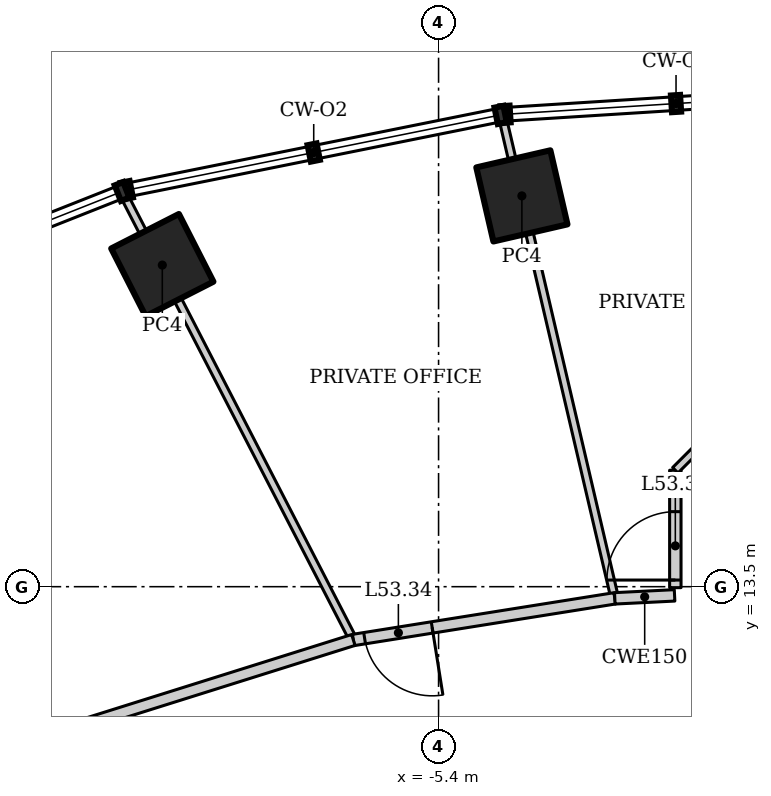
"""IFC4 building model, lengths in metres.
Left out: names, types, materials, properties, quantities, classifications, styles, units other than length and angle.
Written with IfcOpenShell. Run it as: python <this file> out.ifc"""

import sys

from ifc_helpers import new_model, si_unit, direction, frame, frame_2d, origin, origin_2d, place, context, subcontext, project, spatial, rectangle, hollow_rectangle, extrude, element, fill, save


model = new_model("IFC4")
c1 = context("Model", 3, precision=1e-05, world=origin(), true_north=direction((0.0, 1.0)))
c2 = subcontext(c1, "Body", "Model", "MODEL_VIEW")
j1 = project(units=[si_unit("LENGTHUNIT", "METRE"), si_unit("PLANEANGLEUNIT", "RADIAN")], contexts=[c1])
p1 = place(None, origin())
s1 = spatial("IfcSite", under=j1, at=p1, CompositionType="ELEMENT")
p2 = place(p1, origin())
s2 = spatial("IfcBuilding", under=s1, at=p2, CompositionType="ELEMENT")
p3 = place(p2, frame((0.0, 0.0, 228.4)))
s3 = spatial("IfcBuildingStorey", under=s2, at=p3, CompositionType="ELEMENT", Elevation=228.4)
for number, where, z_axis, x_axis in (
    (1, (-4.304, 18.642, 0.0), (0.0, 0.0, 1.0), (0.974, 0.225, 0.0)),
    (2, (-9.035, 17.731, 0.0), (0.0, 0.0, 1.0), (0.891, 0.454, 0.0)),
):
    element("IfcColumn", number, at=place(p3, frame(where, z_axis=z_axis, x_axis=x_axis)), inside=s3, PredefinedType="COLUMN", context=c2, shape_type="SweptSolid", body=[
        extrude(hollow_rectangle(XDim=1.0, YDim=1.0, WallThickness=0.08, at=origin_2d()), origin(), (0.0, 0.0, 1.0), 4.2),
    ])
p4 = place(p3, frame((-4.556, 19.657, 0.0), z_axis=(0.0, 0.0, 1.0), x_axis=(0.227524978141, -0.973772244584, 0.0)))
e3 = element("IfcWall", 3, at=p4, inside=s3, PredefinedType="PARTITIONING", context=c2, shape_type="SweptSolid", body=[
    extrude(rectangle(XDim=6.48, YDim=0.1, at=frame_2d((3.24, 0.0))), origin(), (0.0, 0.0, 1.0), 3.108),
])
p5 = place(p3, frame((-9.54, 18.65, 0.0), z_axis=(0.0, 0.0, 1.0), x_axis=(0.458420942987, -0.888735190611, 0.0)))
e4 = element("IfcWall", 4, at=p5, inside=s3, PredefinedType="PARTITIONING", context=c2, shape_type="SweptSolid", body=[
    extrude(rectangle(XDim=6.584, YDim=0.1, at=frame_2d((3.292, 0.0))), origin(), (0.0, 0.0, 1.0), 3.108),
])
p6 = place(p3, frame((-3.081, 13.347, 0.0), z_axis=(0.0, 0.0, 1.0), x_axis=(-0.987554093087, -0.157279729233, 0.0)))
e5 = element("IfcWall", 5, at=p6, inside=s3, PredefinedType="PARTITIONING", context=c2, shape_type="SweptSolid", body=[
    extrude(rectangle(XDim=3.483, YDim=0.15, at=frame_2d((1.742, 0.0))), origin(), (0.0, 0.0, 1.0), 4.05),
])
p7 = place(p6, frame((2.433, 0.0, 0.0)))
e6 = element("IfcOpeningElement", 6, at=p7, cuts=e5, PredefinedType="OPENING", context=c2, shape_type="SweptSolid", body=[
    extrude(rectangle(XDim=0.9, YDim=2.1, at=frame_2d((0.45, 1.05))), frame((0.0, 0.085, 0.0), z_axis=(0.0, -1.0, 0.0), x_axis=(1.0, 0.0, 0.0)), (0.0, 0.0, 1.0), 0.17),
])
p8 = place(p3, frame((-6.521, 12.799, 0.0), z_axis=(0.0, 0.0, 1.0), x_axis=(-0.954031103669, -0.299707612903, 0.0)))
e7 = element("IfcWall", 7, at=p8, inside=s3, PredefinedType="PARTITIONING", context=c2, shape_type="SweptSolid", body=[
    extrude(rectangle(XDim=4.695, YDim=0.15, at=frame_2d((2.348, 0.0))), origin(), (0.0, 0.0, 1.0), 4.05),
])
p9 = place(p3, frame((-2.295, 13.386, 0.0), z_axis=(0.0, 0.0, 1.0), x_axis=(-0.998768524691, -0.049612841959, 0.0)))
e8 = element("IfcWall", 8, at=p9, inside=s3, PredefinedType="PARTITIONING", context=c2, shape_type="SweptSolid", body=[
    extrude(rectangle(XDim=0.787, YDim=0.15, at=frame_2d((0.394, 0.0))), origin(), (0.0, 0.0, 1.0), 4.05),
])
p10 = place(p3, frame((-2.285, 13.487, 0.0), z_axis=(0.0, 0.0, 1.0), x_axis=(0.0, 1.0, 0.0)))
e9 = element("IfcWall", 9, at=p10, inside=s3, PredefinedType="PARTITIONING", context=c2, shape_type="SweptSolid", body=[
    extrude(rectangle(XDim=1.545, YDim=0.15, at=frame_2d((0.772, 0.0))), origin(), (0.0, 0.0, 1.0), 4.05),
])
p11 = place(p10, frame((0.1, 0.0, 0.0)))
e10 = element("IfcOpeningElement", 10, at=p11, cuts=e9, PredefinedType="OPENING", context=c2, shape_type="SweptSolid", body=[
    extrude(rectangle(XDim=0.9, YDim=2.1, at=frame_2d((0.45, 1.05))), frame((0.0, 0.085, 0.0), z_axis=(0.0, -1.0, 0.0), x_axis=(1.0, 0.0, 0.0)), (0.0, 0.0, 1.0), 0.17),
])
p12 = place(p3, frame((-2.285, 15.032, 0.0), z_axis=(0.0, 0.0, 1.0), x_axis=(0.707106781187, 0.707106781187, 0.0)))
e11 = element("IfcWall", 11, at=p12, inside=s3, PredefinedType="PARTITIONING", context=c2, shape_type="SweptSolid", body=[
    extrude(rectangle(XDim=1.064, YDim=0.1, at=frame_2d((0.532, 0.0))), origin(), (0.0, 0.0, 1.0), 4.05),
])
p13 = place(p11, origin())
e12 = element("IfcDoor", 12, at=p13, inside=s3, OperationType="SINGLE_SWING_LEFT", PredefinedType="DOOR", context=c2, shape_type="SweptSolid", body=[
    extrude(rectangle(XDim=0.9, YDim=2.1, at=frame_2d((0.45, 1.05))), frame((0.0, 0.025, 0.0), z_axis=(0.0, -1.0, 0.0), x_axis=(1.0, 0.0, 0.0)), (0.0, 0.0, 1.0), 0.05),
])
fill(e10, e12)
p14 = place(p7, origin())
e13 = element("IfcDoor", 13, at=p14, inside=s3, OperationType="SINGLE_SWING_LEFT", PredefinedType="DOOR", context=c2, shape_type="SweptSolid", body=[
    extrude(rectangle(XDim=0.9, YDim=2.1, at=frame_2d((0.45, 1.05))), frame((0.0, 0.025, 0.0), z_axis=(0.0, -1.0, 0.0), x_axis=(1.0, 0.0, 0.0)), (0.0, 0.0, 1.0), 0.05),
])
fill(e6, e13)
save(model, sys.argv[1])
